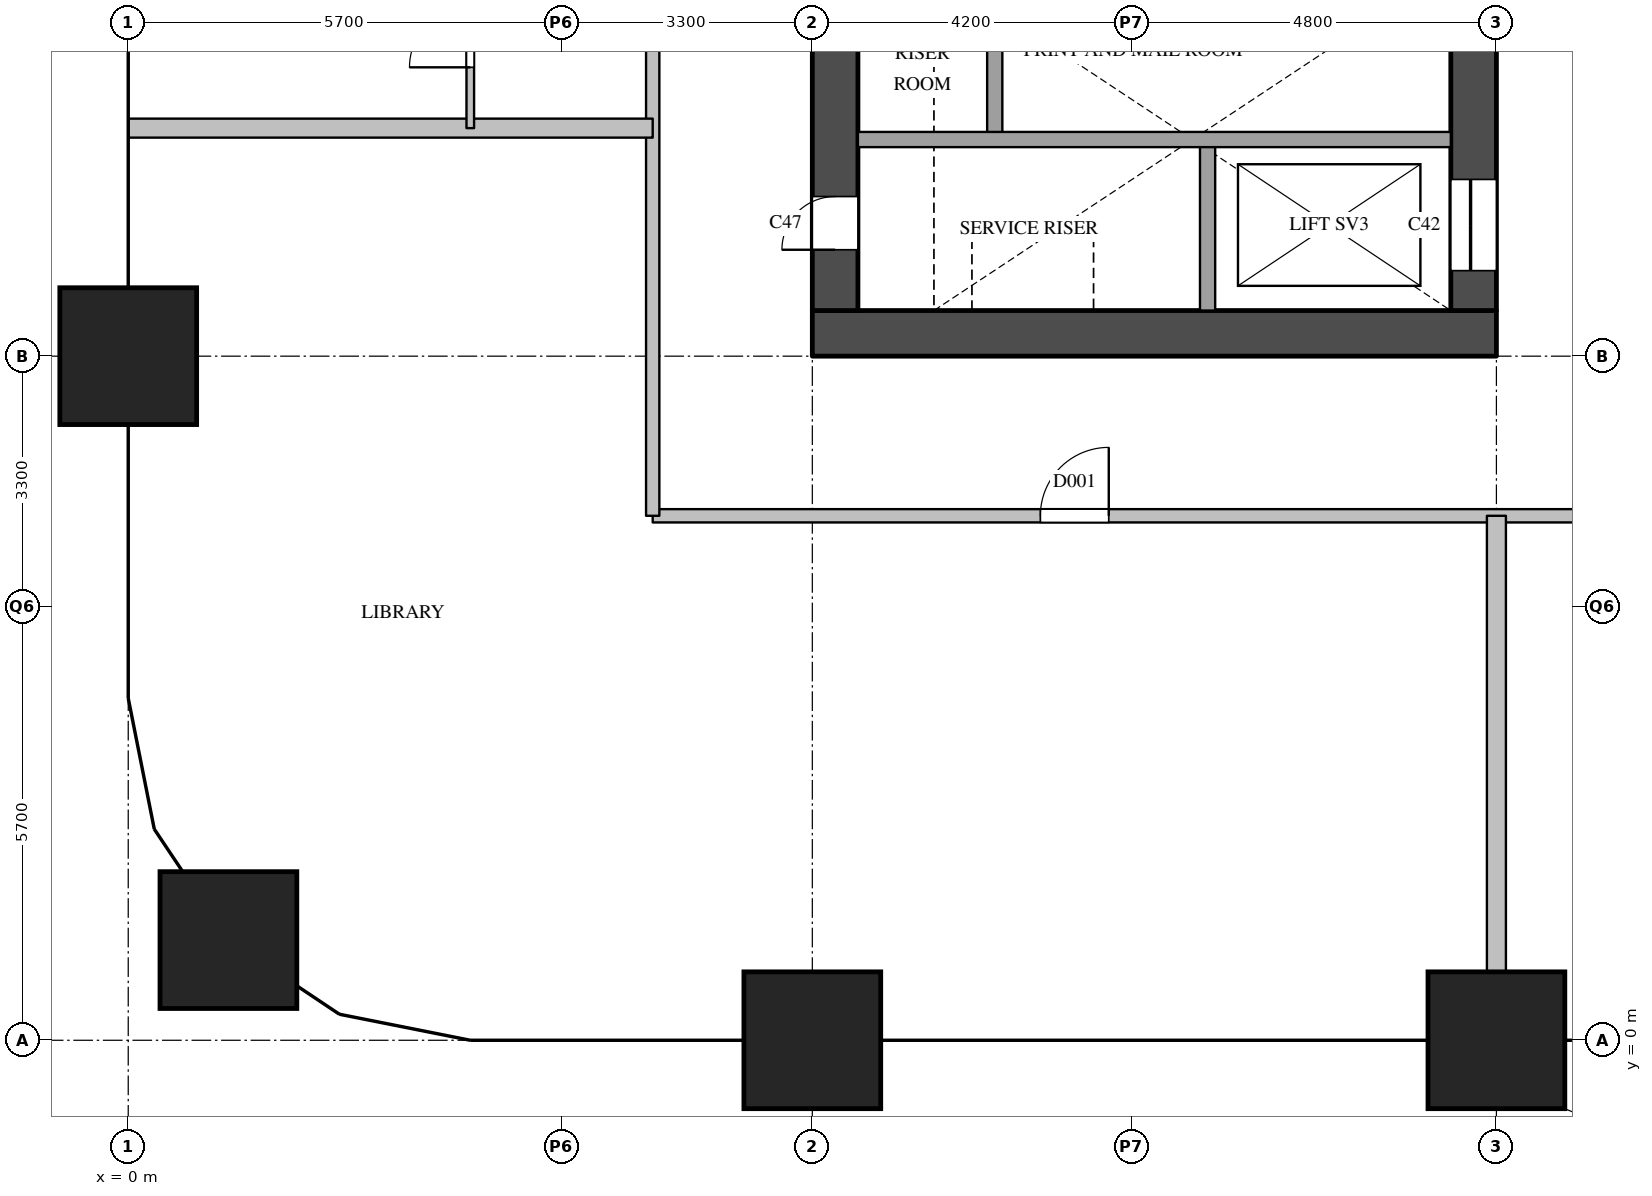
"""IFC4 building model, lengths in metres.
Left out: names, types, materials, properties, quantities, classifications, styles, units other than length and angle.
Written with IfcOpenShell. Run it as: python <this file> out.ifc"""

import sys

from ifc_helpers import new_model, si_unit, direction, frame, frame_2d, origin, origin_2d, place, context, subcontext, project, spatial, rectangle, extrude, element, fill, save


model = new_model("IFC4")
c1 = context("Model", 3, precision=1e-05, world=origin(), true_north=direction((0.0, 1.0)))
c2 = subcontext(c1, "Body", "Model", "MODEL_VIEW")
j1 = project(units=[si_unit("LENGTHUNIT", "METRE"), si_unit("PLANEANGLEUNIT", "RADIAN")], contexts=[c1])
p1 = place(None, origin())
s1 = spatial("IfcSite", under=j1, at=p1, CompositionType="ELEMENT")
p2 = place(p1, origin())
s2 = spatial("IfcBuilding", under=s1, at=p2, CompositionType="ELEMENT")
p3 = place(p2, frame((0.0, 0.0, 46.2)))
s3 = spatial("IfcBuildingStorey", under=s2, at=p3, CompositionType="ELEMENT", Elevation=46.2)
for number, where, z_axis, x_axis in (
    (1, (1.318, 1.318, 0.0), (0.0, 0.0, 1.0), (1.0, 0.0, 0.0)),
    (2, (0.0, 9.0, 0.0), (0.0, 0.0, 1.0), (1.0, 0.0, 0.0)),
    (3, (9.0, 0.0, 0.0), (0.0, 0.0, 1.0), (1.0, 0.0, 0.0)),
    (4, (18.0, 0.0, 0.0), (0.0, 0.0, 1.0), (1.0, 0.0, 0.0)),
):
    element("IfcColumn", number, at=place(p3, frame(where, z_axis=z_axis, x_axis=x_axis)), inside=s3, PredefinedType="COLUMN", context=c2, shape_type="SweptSolid", body=[
        extrude(rectangle(XDim=1.8, YDim=1.8, at=origin_2d()), origin(), (0.0, 0.0, 1.0), 3.8),
    ])
p4 = place(p3, frame((9.0, 9.3, 0.0), z_axis=(0.0, 0.0, 1.0), x_axis=(1.0, 0.0, 0.0)))
e5 = element("IfcWall", 5, at=p4, inside=s3, PredefinedType="SHEAR", context=c2, shape_type="SweptSolid", body=[
    extrude(rectangle(XDim=9.0, YDim=0.6, at=frame_2d((4.5, 0.0))), origin(), (0.0, 0.0, 1.0), 3.5),
])
p5 = place(p3, frame((9.3, 9.6, 0.0), z_axis=(0.0, 0.0, 1.0), x_axis=(0.0, 1.0, 0.0)))
e6 = element("IfcWall", 6, at=p5, inside=s3, PredefinedType="SHEAR", context=c2, shape_type="SweptSolid", body=[
    extrude(rectangle(XDim=12.3, YDim=0.6, at=frame_2d((6.15, 0.0))), origin(), (0.0, 0.0, 1.0), 3.5),
])
p6 = place(p5, frame((0.8, 0.0, 0.0)))
e7 = element("IfcOpeningElement", 7, at=p6, cuts=e6, PredefinedType="OPENING", context=c2, shape_type="SweptSolid", body=[
    extrude(rectangle(XDim=0.7, YDim=2.1, at=frame_2d((0.35, 1.05))), frame((0.0, 0.31, 0.0), z_axis=(0.0, -1.0, 0.0), x_axis=(1.0, 0.0, 0.0)), (0.0, 0.0, 1.0), 0.62),
])
p7 = place(p5, frame((4.8, 0.0, 0.0)))
e8 = element("IfcOpeningElement", 8, at=p7, cuts=e6, PredefinedType="OPENING", context=c2, shape_type="SweptSolid", body=[
    extrude(rectangle(XDim=1.0, YDim=2.1, at=frame_2d((0.5, 1.05))), frame((0.0, 0.31, 0.0), z_axis=(0.0, -1.0, 0.0), x_axis=(1.0, 0.0, 0.0)), (0.0, 0.0, 1.0), 0.62),
])
p8 = place(p3, frame((17.7, 9.6, 0.0), z_axis=(0.0, 0.0, 1.0), x_axis=(0.0, 1.0, 0.0)))
e9 = element("IfcWall", 9, at=p8, inside=s3, PredefinedType="SHEAR", context=c2, shape_type="SweptSolid", body=[
    extrude(rectangle(XDim=12.3, YDim=0.6, at=frame_2d((6.15, 0.0))), origin(), (0.0, 0.0, 1.0), 3.5),
])
p9 = place(p8, frame((0.525, 0.0, 0.0)))
e10 = element("IfcOpeningElement", 10, at=p9, cuts=e9, PredefinedType="OPENING", context=c2, shape_type="SweptSolid", body=[
    extrude(rectangle(XDim=1.2, YDim=2.1, at=frame_2d((0.6, 1.05))), frame((0.0, 0.31, 0.0), z_axis=(0.0, -1.0, 0.0), x_axis=(1.0, 0.0, 0.0)), (0.0, 0.0, 1.0), 0.62),
])
p10 = place(p3, frame((11.4, 11.9, 0.0), z_axis=(0.0, 0.0, 1.0), x_axis=(0.0, 1.0, 0.0)))
e11 = element("IfcWall", 11, at=p10, inside=s3, PredefinedType="SOLIDWALL", context=c2, shape_type="SweptSolid", body=[
    extrude(rectangle(XDim=2.2, YDim=0.2, at=frame_2d((1.1, 0.0))), origin(), (0.0, 0.0, 1.0), 3.5),
])
p11 = place(p3, frame((14.2, 9.6, 0.0), z_axis=(0.0, 0.0, 1.0), x_axis=(0.0, 1.0, 0.0)))
e12 = element("IfcWall", 12, at=p11, inside=s3, PredefinedType="SOLIDWALL", context=c2, shape_type="SweptSolid", body=[
    extrude(rectangle(XDim=2.3, YDim=0.2, at=frame_2d((1.15, 0.0))), origin(), (0.0, 0.0, 1.0), 3.5),
])
p12 = place(p3, frame((9.6, 11.85, 0.0), z_axis=(0.0, 0.0, 1.0), x_axis=(1.0, 0.0, 0.0)))
e13 = element("IfcWall", 13, at=p12, inside=s3, PredefinedType="SOLIDWALL", context=c2, shape_type="SweptSolid", body=[
    extrude(rectangle(XDim=7.8, YDim=0.2, at=frame_2d((3.9, 0.0))), origin(), (0.0, 0.0, 1.0), 3.5),
])
p13 = place(p3, frame((6.9, 6.9, 0.0), z_axis=(0.0, 0.0, 1.0), x_axis=(1.0, 0.0, 0.0)))
e14 = element("IfcWall", 14, at=p13, inside=s3, PredefinedType="PARTITIONING", context=c2, shape_type="SweptSolid", body=[
    extrude(rectangle(XDim=13.2, YDim=0.175, at=frame_2d((6.6, 0.0))), origin(), (0.0, 0.0, 1.0), 3.5),
])
p14 = place(p13, frame((5.1, 0.0, 0.0)))
e15 = element("IfcOpeningElement", 15, at=p14, cuts=e14, PredefinedType="OPENING", context=c2, shape_type="SweptSolid", body=[
    extrude(rectangle(XDim=0.9, YDim=2.1, at=frame_2d((0.45, 1.05))), frame((0.0, 0.097, 0.0), z_axis=(0.0, -1.0, 0.0), x_axis=(1.0, 0.0, 0.0)), (0.0, 0.0, 1.0), 0.195),
])
p15 = place(p3, frame((6.9, 6.9, 0.0), z_axis=(0.0, 0.0, 1.0), x_axis=(0.0, 1.0, 0.0)))
e16 = element("IfcWall", 16, at=p15, inside=s3, PredefinedType="PARTITIONING", context=c2, shape_type="SweptSolid", body=[
    extrude(rectangle(XDim=17.09, YDim=0.175, at=frame_2d((8.545, 0.0))), origin(), (0.0, 0.0, 1.0), 3.5),
])
p16 = place(p15, frame((8.8, 0.0, 0.0)))
e17 = element("IfcOpeningElement", 17, at=p16, cuts=e16, PredefinedType="OPENING", context=c2, shape_type="SweptSolid", body=[
    extrude(rectangle(XDim=1.0, YDim=2.1, at=frame_2d((0.5, 1.05))), frame((0.0, 0.097, 0.0), z_axis=(0.0, -1.0, 0.0), x_axis=(1.0, 0.0, 0.0)), (0.0, 0.0, 1.0), 0.195),
])
p17 = place(p15, frame((14.795, 0.0, 0.0)))
e18 = element("IfcOpeningElement", 18, at=p17, cuts=e16, PredefinedType="OPENING", context=c2, shape_type="SweptSolid", body=[
    extrude(rectangle(XDim=1.0, YDim=2.1, at=frame_2d((0.5, 1.05))), frame((0.0, 0.097, 0.0), z_axis=(0.0, -1.0, 0.0), x_axis=(1.0, 0.0, 0.0)), (0.0, 0.0, 1.0), 0.195),
])
p18 = place(p3, frame((0.0, 12.0, 0.0), z_axis=(0.0, 0.0, 1.0), x_axis=(1.0, 0.0, 0.0)))
e19 = element("IfcWall", 19, at=p18, inside=s3, PredefinedType="PARTITIONING", context=c2, shape_type="SweptSolid", body=[
    extrude(rectangle(XDim=6.9, YDim=0.25, at=frame_2d((3.45, 0.0))), origin(), (0.0, 0.0, 1.0), 2.5),
])
p19 = place(p3, frame((18.0, 0.0, 0.0), z_axis=(0.0, 0.0, 1.0), x_axis=(0.0, 1.0, 0.0)))
e20 = element("IfcWall", 20, at=p19, inside=s3, PredefinedType="PARTITIONING", context=c2, shape_type="SweptSolid", body=[
    extrude(rectangle(XDim=6.9, YDim=0.25, at=frame_2d((3.45, 0.0))), origin(), (0.0, 0.0, 1.0), 3.5),
])
p20 = place(p3, frame((4.5, 12.0, 0.0), z_axis=(0.0, 0.0, 1.0), x_axis=(0.0, 1.0, 0.0)))
e21 = element("IfcWall", 21, at=p20, inside=s3, PredefinedType="PARTITIONING", context=c2, shape_type="SweptSolid", body=[
    extrude(rectangle(XDim=2.4, YDim=0.1, at=frame_2d((1.2, 0.0))), origin(), (0.0, 0.0, 1.0), 3.5),
])
p21 = place(p20, frame((0.8, 0.0, 0.0)))
e22 = element("IfcOpeningElement", 22, at=p21, cuts=e21, PredefinedType="OPENING", context=c2, shape_type="SweptSolid", body=[
    extrude(rectangle(XDim=0.8, YDim=2.1, at=frame_2d((0.4, 1.05))), frame((0.0, 0.06, 0.0), z_axis=(0.0, -1.0, 0.0), x_axis=(1.0, 0.0, 0.0)), (0.0, 0.0, 1.0), 0.12),
])
p22 = place(p9, origin())
e23 = element("IfcDoor", 23, at=p22, inside=s3, OperationType="SLIDING_TO_LEFT", PredefinedType="DOOR", context=c2, shape_type="SweptSolid", body=[
    extrude(rectangle(XDim=1.2, YDim=2.1, at=frame_2d((0.6, 1.05))), frame((0.0, 0.025, 0.0), z_axis=(0.0, -1.0, 0.0), x_axis=(1.0, 0.0, 0.0)), (0.0, 0.0, 1.0), 0.05),
])
fill(e10, e23)
p23 = place(p6, origin())
e24 = element("IfcDoor", 24, at=p23, inside=s3, OperationType="SINGLE_SWING_LEFT", PredefinedType="DOOR", context=c2, shape_type="SweptSolid", body=[
    extrude(rectangle(XDim=0.7, YDim=2.1, at=frame_2d((0.35, 1.05))), frame((0.0, 0.025, 0.0), z_axis=(0.0, -1.0, 0.0), x_axis=(1.0, 0.0, 0.0)), (0.0, 0.0, 1.0), 0.05),
])
fill(e7, e24)
p24 = place(p14, origin())
e25 = element("IfcDoor", 25, at=p24, inside=s3, OperationType="SINGLE_SWING_RIGHT", PredefinedType="DOOR", context=c2, shape_type="SweptSolid", body=[
    extrude(rectangle(XDim=0.9, YDim=2.1, at=frame_2d((0.45, 1.05))), frame((0.0, 0.025, 0.0), z_axis=(0.0, -1.0, 0.0), x_axis=(1.0, 0.0, 0.0)), (0.0, 0.0, 1.0), 0.05),
])
fill(e15, e25)
p25 = place(p21, origin())
e26 = element("IfcDoor", 26, at=p25, inside=s3, OperationType="SINGLE_SWING_LEFT", PredefinedType="DOOR", context=c2, shape_type="SweptSolid", body=[
    extrude(rectangle(XDim=0.8, YDim=2.1, at=frame_2d((0.4, 1.05))), frame((0.0, 0.025, 0.0), z_axis=(0.0, -1.0, 0.0), x_axis=(1.0, 0.0, 0.0)), (0.0, 0.0, 1.0), 0.05),
])
fill(e22, e26)
save(model, sys.argv[1])
